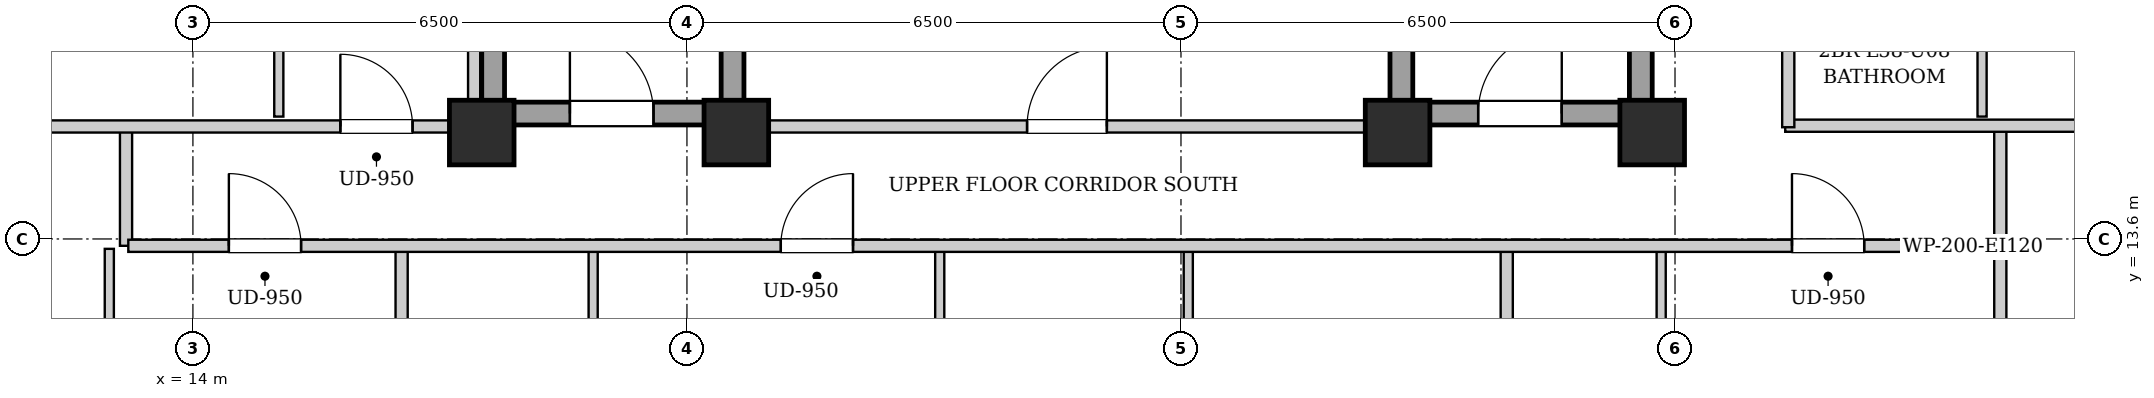
"""IFC4 building model, lengths in metres.
Left out: names, types, materials, properties, quantities, classifications, styles, units other than length and angle.
Written with IfcOpenShell. Run it as: python <this file> out.ifc"""

import sys

from ifc_helpers import new_model, si_unit, direction, frame, frame_2d, origin, origin_2d, place, context, subcontext, project, spatial, rectangle, extrude, element, fill, save


model = new_model("IFC4")
c1 = context("Model", 3, precision=1e-05, world=origin(), true_north=direction((0.0, 1.0)))
c2 = subcontext(c1, "Body", "Model", "MODEL_VIEW")
j1 = project(units=[si_unit("LENGTHUNIT", "METRE"), si_unit("PLANEANGLEUNIT", "RADIAN")], contexts=[c1])
p1 = place(None, origin())
s1 = spatial("IfcSite", under=j1, at=p1, CompositionType="ELEMENT")
p2 = place(p1, origin())
s2 = spatial("IfcBuilding", under=s1, at=p2, CompositionType="ELEMENT")
p3 = place(p2, frame((0.0, 0.0, 200.8)))
s3 = spatial("IfcBuildingStorey", under=s2, at=p3, CompositionType="ELEMENT", Elevation=200.8)
for number, where, z_axis, x_axis in (
    (1, (17.8, 15.0, 0.0), (0.0, 0.0, 1.0), (1.0, 0.0, 0.0)),
    (2, (21.15, 15.0, 0.0), (0.0, 0.0, 1.0), (1.0, 0.0, 0.0)),
    (3, (29.85, 15.0, 0.0), (0.0, 0.0, 1.0), (1.0, 0.0, 0.0)),
    (4, (33.2, 15.0, 0.0), (0.0, 0.0, 1.0), (1.0, 0.0, 0.0)),
):
    element("IfcColumn", number, at=place(p3, frame(where, z_axis=z_axis, x_axis=x_axis)), inside=s3, PredefinedType="COLUMN", context=c2, shape_type="SweptSolid", body=[
        extrude(rectangle(XDim=0.85, YDim=0.85, at=origin_2d()), origin(), (0.0, 0.0, 1.0), 3.3),
    ])
for number, where, z_axis, x_axis in (
    (5, (17.95, 15.1, 0.0), (0.0, 0.0, 1.0), (0.0, 1.0, 0.0)),
    (6, (21.1, 15.1, 0.0), (0.0, 0.0, 1.0), (0.0, 1.0, 0.0)),
):
    element("IfcWall", number, at=place(p3, frame(where, z_axis=z_axis, x_axis=x_axis)), inside=s3, PredefinedType="SHEAR", context=c2, shape_type="SweptSolid", body=[
        extrude(rectangle(XDim=9.0, YDim=0.3, at=frame_2d((4.5, 0.0))), origin(), (0.0, 0.0, 1.0), 3.04),
    ])
p4 = place(p3, frame((18.1, 15.25, 0.0), z_axis=(0.0, 0.0, 1.0), x_axis=(1.0, 0.0, 0.0)))
e7 = element("IfcWall", 7, at=p4, inside=s3, PredefinedType="SHEAR", context=c2, shape_type="SweptSolid", body=[
    extrude(rectangle(XDim=2.85, YDim=0.3, at=frame_2d((1.425, 0.0))), origin(), (0.0, 0.0, 1.0), 3.04),
])
p5 = place(p4, frame((0.86, 0.0, 0.0)))
e8 = element("IfcOpeningElement", 8, at=p5, cuts=e7, PredefinedType="OPENING", context=c2, shape_type="SweptSolid", body=[
    extrude(rectangle(XDim=1.1, YDim=2.05, at=frame_2d((0.55, 1.025))), frame((0.0, 0.16, 0.0), z_axis=(0.0, -1.0, 0.0), x_axis=(1.0, 0.0, 0.0)), (0.0, 0.0, 1.0), 0.32),
])
for number, where, z_axis, x_axis in (
    (9, (29.9, 15.1, 0.0), (0.0, 0.0, 1.0), (0.0, 1.0, 0.0)),
    (10, (33.05, 15.1, 0.0), (0.0, 0.0, 1.0), (0.0, 1.0, 0.0)),
):
    element("IfcWall", number, at=place(p3, frame(where, z_axis=z_axis, x_axis=x_axis)), inside=s3, PredefinedType="SHEAR", context=c2, shape_type="SweptSolid", body=[
        extrude(rectangle(XDim=9.0, YDim=0.3, at=frame_2d((4.5, 0.0))), origin(), (0.0, 0.0, 1.0), 3.04),
    ])
p6 = place(p3, frame((30.05, 15.25, 0.0), z_axis=(0.0, 0.0, 1.0), x_axis=(1.0, 0.0, 0.0)))
e11 = element("IfcWall", 11, at=p6, inside=s3, PredefinedType="SHEAR", context=c2, shape_type="SweptSolid", body=[
    extrude(rectangle(XDim=2.85, YDim=0.3, at=frame_2d((1.425, 0.0))), origin(), (0.0, 0.0, 1.0), 3.04),
])
p7 = place(p6, frame((0.86, 0.0, 0.0)))
e12 = element("IfcOpeningElement", 12, at=p7, cuts=e11, PredefinedType="OPENING", context=c2, shape_type="SweptSolid", body=[
    extrude(rectangle(XDim=1.1, YDim=2.05, at=frame_2d((0.55, 1.025))), frame((0.0, 0.16, 0.0), z_axis=(0.0, -1.0, 0.0), x_axis=(1.0, 0.0, 0.0)), (0.0, 0.0, 1.0), 0.32),
])
p8 = place(p3, frame((21.25, 15.08, 0.0), z_axis=(0.0, 0.0, 1.0), x_axis=(1.0, 0.0, 0.0)))
e13 = element("IfcWall", 13, at=p8, inside=s3, PredefinedType="PARTITIONING", context=c2, shape_type="SweptSolid", body=[
    extrude(rectangle(XDim=8.5, YDim=0.16, at=frame_2d((4.25, 0.0))), origin(), (0.0, 0.0, 1.0), 2.556),
])
p9 = place(p8, frame((3.725, 0.0, 0.0)))
e14 = element("IfcOpeningElement", 14, at=p9, cuts=e13, PredefinedType="OPENING", context=c2, shape_type="SweptSolid", body=[
    extrude(rectangle(XDim=1.05, YDim=2.05, at=frame_2d((0.525, 1.025))), frame((0.0, 0.09, 0.0), z_axis=(0.0, -1.0, 0.0), x_axis=(1.0, 0.0, 0.0)), (0.0, 0.0, 1.0), 0.18),
])
for number, where, z_axis, x_axis in (
    (15, (13.12, 13.51, 0.0), (0.0, 0.0, 1.0), (0.0, 1.0, 0.0)),
    (16, (37.78, 13.51, 0.0), (0.0, 0.0, 1.0), (0.0, 1.0, 0.0)),
):
    element("IfcWall", number, at=place(p3, frame(where, z_axis=z_axis, x_axis=x_axis)), inside=s3, PredefinedType="PARTITIONING", context=c2, shape_type="SweptSolid", body=[
        extrude(rectangle(XDim=1.58, YDim=0.16, at=frame_2d((0.79, 0.0))), origin(), (0.0, 0.0, 1.0), 3.04),
    ])
p10 = place(p3, frame((34.95, 15.09, 0.0), z_axis=(0.0, 0.0, 1.0), x_axis=(1.0, 0.0, 0.0)))
e17 = element("IfcWall", 17, at=p10, inside=s3, PredefinedType="PARTITIONING", context=c2, shape_type="SweptSolid", body=[
    extrude(rectangle(XDim=5.07, YDim=0.16, at=frame_2d((2.535, 0.0))), origin(), (0.0, 0.0, 1.0), 2.556),
])
p11 = place(p3, frame((12.9, 10.62, 0.0), z_axis=(0.0, 0.0, 1.0), x_axis=(0.0, 1.0, 0.0)))
e18 = element("IfcWall", 18, at=p11, inside=s3, PredefinedType="PARTITIONING", context=c2, shape_type="SweptSolid", body=[
    extrude(rectangle(XDim=2.85, YDim=0.12, at=frame_2d((1.425, 0.0))), origin(), (0.0, 0.0, 1.0), 3.04),
])
p12 = place(p11, frame((0.995, 0.0, 0.0)))
e19 = element("IfcOpeningElement", 19, at=p12, cuts=e18, PredefinedType="OPENING", context=c2, shape_type="SweptSolid", body=[
    extrude(rectangle(XDim=0.86, YDim=2.05, at=frame_2d((0.43, 1.025))), frame((0.0, 0.07, 0.0), z_axis=(0.0, -1.0, 0.0), x_axis=(1.0, 0.0, 0.0)), (0.0, 0.0, 1.0), 0.14),
])
p13 = place(p3, frame((16.746, 6.06, 0.0), z_axis=(0.0, 0.0, 1.0), x_axis=(0.0, 1.0, 0.0)))
e20 = element("IfcWall", 20, at=p13, inside=s3, PredefinedType="PARTITIONING", context=c2, shape_type="SweptSolid", body=[
    extrude(rectangle(XDim=7.41, YDim=0.16, at=frame_2d((3.705, 0.0))), origin(), (0.0, 0.0, 1.0), 3.04),
])
p14 = place(p3, frame((19.266, 10.62, 0.0), z_axis=(0.0, 0.0, 1.0), x_axis=(0.0, 1.0, 0.0)))
e21 = element("IfcWall", 21, at=p14, inside=s3, PredefinedType="PARTITIONING", context=c2, shape_type="SweptSolid", body=[
    extrude(rectangle(XDim=2.85, YDim=0.12, at=frame_2d((1.425, 0.0))), origin(), (0.0, 0.0, 1.0), 3.04),
])
p15 = place(p14, frame((0.995, 0.0, 0.0)))
e22 = element("IfcOpeningElement", 22, at=p15, cuts=e21, PredefinedType="OPENING", context=c2, shape_type="SweptSolid", body=[
    extrude(rectangle(XDim=0.86, YDim=2.05, at=frame_2d((0.43, 1.025))), frame((0.0, 0.07, 0.0), z_axis=(0.0, -1.0, 0.0), x_axis=(1.0, 0.0, 0.0)), (0.0, 0.0, 1.0), 0.14),
])
p16 = place(p3, frame((23.826, 10.62, 0.0), z_axis=(0.0, 0.0, 1.0), x_axis=(0.0, 1.0, 0.0)))
e23 = element("IfcWall", 23, at=p16, inside=s3, PredefinedType="PARTITIONING", context=c2, shape_type="SweptSolid", body=[
    extrude(rectangle(XDim=2.85, YDim=0.12, at=frame_2d((1.425, 0.0))), origin(), (0.0, 0.0, 1.0), 3.04),
])
p17 = place(p16, frame((0.975, 0.0, 0.0)))
e24 = element("IfcOpeningElement", 24, at=p17, cuts=e23, PredefinedType="OPENING", context=c2, shape_type="SweptSolid", body=[
    extrude(rectangle(XDim=0.9, YDim=2.05, at=frame_2d((0.45, 1.025))), frame((0.0, 0.07, 0.0), z_axis=(0.0, -1.0, 0.0), x_axis=(1.0, 0.0, 0.0)), (0.0, 0.0, 1.0), 0.14),
])
p18 = place(p3, frame((27.096, 10.62, 0.0), z_axis=(0.0, 0.0, 1.0), x_axis=(0.0, 1.0, 0.0)))
e25 = element("IfcWall", 25, at=p18, inside=s3, PredefinedType="PARTITIONING", context=c2, shape_type="SweptSolid", body=[
    extrude(rectangle(XDim=2.85, YDim=0.12, at=frame_2d((1.425, 0.0))), origin(), (0.0, 0.0, 1.0), 3.04),
])
p19 = place(p18, frame((0.975, 0.0, 0.0)))
e26 = element("IfcOpeningElement", 26, at=p19, cuts=e25, PredefinedType="OPENING", context=c2, shape_type="SweptSolid", body=[
    extrude(rectangle(XDim=0.9, YDim=2.05, at=frame_2d((0.45, 1.025))), frame((0.0, 0.07, 0.0), z_axis=(0.0, -1.0, 0.0), x_axis=(1.0, 0.0, 0.0)), (0.0, 0.0, 1.0), 0.14),
])
p20 = place(p3, frame((37.78, 10.56, 0.0), z_axis=(0.0, 0.0, 1.0), x_axis=(0.0, 1.0, 0.0)))
e27 = element("IfcWall", 27, at=p20, inside=s3, PredefinedType="PARTITIONING", context=c2, shape_type="SweptSolid", body=[
    extrude(rectangle(XDim=2.91, YDim=0.16, at=frame_2d((1.455, 0.0))), origin(), (0.0, 0.0, 1.0), 3.04),
])
p21 = place(p3, frame((31.286, 4.08, 0.0), z_axis=(0.0, 0.0, 1.0), x_axis=(0.0, 1.0, 0.0)))
e28 = element("IfcWall", 28, at=p21, inside=s3, PredefinedType="PARTITIONING", context=c2, shape_type="SweptSolid", body=[
    extrude(rectangle(XDim=9.39, YDim=0.16, at=frame_2d((4.695, 0.0))), origin(), (0.0, 0.0, 1.0), 3.04),
])
p22 = place(p3, frame((33.318, 10.62, 0.0), z_axis=(0.0, 0.0, 1.0), x_axis=(0.0, 1.0, 0.0)))
e29 = element("IfcWall", 29, at=p22, inside=s3, PredefinedType="PARTITIONING", context=c2, shape_type="SweptSolid", body=[
    extrude(rectangle(XDim=2.85, YDim=0.12, at=frame_2d((1.425, 0.0))), origin(), (0.0, 0.0, 1.0), 3.04),
])
p23 = place(p22, frame((0.995, 0.0, 0.0)))
e30 = element("IfcOpeningElement", 30, at=p23, cuts=e29, PredefinedType="OPENING", context=c2, shape_type="SweptSolid", body=[
    extrude(rectangle(XDim=0.86, YDim=2.05, at=frame_2d((0.43, 1.025))), frame((0.0, 0.07, 0.0), z_axis=(0.0, -1.0, 0.0), x_axis=(1.0, 0.0, 0.0)), (0.0, 0.0, 1.0), 0.14),
])
p24 = place(p3, frame((10.88, 15.08, 0.0), z_axis=(0.0, 0.0, 1.0), x_axis=(1.0, 0.0, 0.0)))
e31 = element("IfcWall", 31, at=p24, inside=s3, PredefinedType="PARTITIONING", context=c2, shape_type="SweptSolid", body=[
    extrude(rectangle(XDim=6.88, YDim=0.16, at=frame_2d((3.44, 0.0))), origin(), (0.0, 0.0, 1.0), 2.556),
])
p25 = place(p24, frame((5.06, 0.0, 0.0)))
e32 = element("IfcOpeningElement", 32, at=p25, cuts=e31, PredefinedType="OPENING", context=c2, shape_type="SweptSolid", body=[
    extrude(rectangle(XDim=0.95, YDim=2.1, at=frame_2d((0.475, 1.05))), frame((0.0, 0.09, 0.0), z_axis=(0.0, -1.0, 0.0), x_axis=(1.0, 0.0, 0.0)), (0.0, 0.0, 1.0), 0.18),
])
p26 = place(p3, frame((15.13, 15.21, 0.0), z_axis=(0.0, 0.0, 1.0), x_axis=(0.0, 1.0, 0.0)))
e33 = element("IfcWall", 33, at=p26, inside=s3, PredefinedType="PARTITIONING", context=c2, shape_type="SweptSolid", body=[
    extrude(rectangle(XDim=4.5, YDim=0.12, at=frame_2d((2.25, 0.0))), origin(), (0.0, 0.0, 1.0), 3.04),
])
p27 = place(p26, frame((1.8, 0.0, 0.0)))
e34 = element("IfcOpeningElement", 34, at=p27, cuts=e33, PredefinedType="OPENING", context=c2, shape_type="SweptSolid", body=[
    extrude(rectangle(XDim=0.9, YDim=2.05, at=frame_2d((0.45, 1.025))), frame((0.0, 0.07, 0.0), z_axis=(0.0, -1.0, 0.0), x_axis=(1.0, 0.0, 0.0)), (0.0, 0.0, 1.0), 0.14),
])
p28 = place(p3, frame((37.54, 15.21, 0.0), z_axis=(0.0, 0.0, 1.0), x_axis=(0.0, 1.0, 0.0)))
e35 = element("IfcWall", 35, at=p28, inside=s3, PredefinedType="PARTITIONING", context=c2, shape_type="SweptSolid", body=[
    extrude(rectangle(XDim=2.3, YDim=0.12, at=frame_2d((1.15, 0.0))), origin(), (0.0, 0.0, 1.0), 3.04),
])
p29 = place(p3, frame((13.15, 13.51, 0.0), z_axis=(0.0, 0.0, 1.0), x_axis=(1.0, 0.0, 0.0)))
e36 = element("IfcWall", 36, at=p29, inside=s3, PredefinedType="PARTITIONING", context=c2, shape_type="SweptSolid", body=[
    extrude(rectangle(XDim=24.6, YDim=0.16, at=frame_2d((12.3, 0.0))), origin(), (0.0, 0.0, 1.0), 3.04),
])
p30 = place(p29, frame((1.323, 0.0, 0.0)))
e37 = element("IfcOpeningElement", 37, at=p30, cuts=e36, PredefinedType="OPENING", context=c2, shape_type="SweptSolid", body=[
    extrude(rectangle(XDim=0.95, YDim=2.1, at=frame_2d((0.475, 1.05))), frame((0.0, 0.09, 0.0), z_axis=(0.0, -1.0, 0.0), x_axis=(1.0, 0.0, 0.0)), (0.0, 0.0, 1.0), 0.18),
])
p31 = place(p29, frame((8.585, 0.0, 0.0)))
e38 = element("IfcOpeningElement", 38, at=p31, cuts=e36, PredefinedType="OPENING", context=c2, shape_type="SweptSolid", body=[
    extrude(rectangle(XDim=0.95, YDim=2.1, at=frame_2d((0.475, 1.05))), frame((0.0, 0.09, 0.0), z_axis=(0.0, -1.0, 0.0), x_axis=(1.0, 0.0, 0.0)), (0.0, 0.0, 1.0), 0.18),
])
p32 = place(p29, frame((21.889, 0.0, 0.0)))
e39 = element("IfcOpeningElement", 39, at=p32, cuts=e36, PredefinedType="OPENING", context=c2, shape_type="SweptSolid", body=[
    extrude(rectangle(XDim=0.95, YDim=2.1, at=frame_2d((0.475, 1.05))), frame((0.0, 0.09, 0.0), z_axis=(0.0, -1.0, 0.0), x_axis=(1.0, 0.0, 0.0)), (0.0, 0.0, 1.0), 0.18),
])
p33 = place(p3, frame((17.7, 15.02, 0.0), z_axis=(0.0, 0.0, 1.0), x_axis=(0.0, 1.0, 0.0)))
e40 = element("IfcWall", 40, at=p33, inside=s3, PredefinedType="PARTITIONING", context=c2, shape_type="SweptSolid", body=[
    extrude(rectangle(XDim=13.98, YDim=0.16, at=frame_2d((6.99, 0.0))), origin(), (0.0, 0.0, 1.0), 3.04),
])
p34 = place(p3, frame((34.99, 15.07, 0.0), z_axis=(0.0, 0.0, 1.0), x_axis=(0.0, 1.0, 0.0)))
e41 = element("IfcWall", 41, at=p34, inside=s3, PredefinedType="PARTITIONING", context=c2, shape_type="SweptSolid", body=[
    extrude(rectangle(XDim=13.93, YDim=0.16, at=frame_2d((6.965, 0.0))), origin(), (0.0, 0.0, 1.0), 3.04),
])
p35 = place(p34, frame((4.385, 0.0, 0.0)))
e42 = element("IfcOpeningElement", 42, at=p35, cuts=e41, PredefinedType="OPENING", context=c2, shape_type="SweptSolid", body=[
    extrude(rectangle(XDim=0.95, YDim=2.1, at=frame_2d((0.475, 1.05))), frame((0.0, 0.09, 0.0), z_axis=(0.0, -1.0, 0.0), x_axis=(1.0, 0.0, 0.0)), (0.0, 0.0, 1.0), 0.18),
])
p36 = place(p5, origin())
e43 = element("IfcDoor", 43, at=p36, inside=s3, OperationType="SINGLE_SWING_LEFT", PredefinedType="DOOR", context=c2, shape_type="SweptSolid", body=[
    extrude(rectangle(XDim=1.1, YDim=2.05, at=frame_2d((0.55, 1.025))), frame((0.0, 0.025, 0.0), z_axis=(0.0, -1.0, 0.0), x_axis=(1.0, 0.0, 0.0)), (0.0, 0.0, 1.0), 0.05),
])
fill(e8, e43)
p37 = place(p7, origin())
e44 = element("IfcDoor", 44, at=p37, inside=s3, OperationType="SINGLE_SWING_RIGHT", PredefinedType="DOOR", context=c2, shape_type="SweptSolid", body=[
    extrude(rectangle(XDim=1.1, YDim=2.05, at=frame_2d((0.55, 1.025))), frame((0.0, 0.025, 0.0), z_axis=(0.0, -1.0, 0.0), x_axis=(1.0, 0.0, 0.0)), (0.0, 0.0, 1.0), 0.05),
])
fill(e12, e44)
p38 = place(p9, origin())
e45 = element("IfcDoor", 45, at=p38, inside=s3, OperationType="SINGLE_SWING_RIGHT", PredefinedType="DOOR", context=c2, shape_type="SweptSolid", body=[
    extrude(rectangle(XDim=1.05, YDim=2.05, at=frame_2d((0.525, 1.025))), frame((0.0, 0.025, 0.0), z_axis=(0.0, -1.0, 0.0), x_axis=(1.0, 0.0, 0.0)), (0.0, 0.0, 1.0), 0.05),
])
fill(e14, e45)
p39 = place(p25, origin())
e46 = element("IfcDoor", 46, at=p39, inside=s3, OperationType="SINGLE_SWING_LEFT", PredefinedType="DOOR", context=c2, shape_type="SweptSolid", body=[
    extrude(rectangle(XDim=0.95, YDim=2.1, at=frame_2d((0.475, 1.05))), frame((0.0, 0.025, 0.0), z_axis=(0.0, -1.0, 0.0), x_axis=(1.0, 0.0, 0.0)), (0.0, 0.0, 1.0), 0.05),
])
fill(e32, e46)
p40 = place(p30, origin())
e47 = element("IfcDoor", 47, at=p40, inside=s3, OperationType="SINGLE_SWING_LEFT", PredefinedType="DOOR", context=c2, shape_type="SweptSolid", body=[
    extrude(rectangle(XDim=0.95, YDim=2.1, at=frame_2d((0.475, 1.05))), frame((0.0, 0.025, 0.0), z_axis=(0.0, -1.0, 0.0), x_axis=(1.0, 0.0, 0.0)), (0.0, 0.0, 1.0), 0.05),
])
fill(e37, e47)
p41 = place(p31, origin())
e48 = element("IfcDoor", 48, at=p41, inside=s3, OperationType="SINGLE_SWING_RIGHT", PredefinedType="DOOR", context=c2, shape_type="SweptSolid", body=[
    extrude(rectangle(XDim=0.95, YDim=2.1, at=frame_2d((0.475, 1.05))), frame((0.0, 0.025, 0.0), z_axis=(0.0, -1.0, 0.0), x_axis=(1.0, 0.0, 0.0)), (0.0, 0.0, 1.0), 0.05),
])
fill(e38, e48)
p42 = place(p32, origin())
e49 = element("IfcDoor", 49, at=p42, inside=s3, OperationType="SINGLE_SWING_LEFT", PredefinedType="DOOR", context=c2, shape_type="SweptSolid", body=[
    extrude(rectangle(XDim=0.95, YDim=2.1, at=frame_2d((0.475, 1.05))), frame((0.0, 0.025, 0.0), z_axis=(0.0, -1.0, 0.0), x_axis=(1.0, 0.0, 0.0)), (0.0, 0.0, 1.0), 0.05),
])
fill(e39, e49)
save(model, sys.argv[1])
